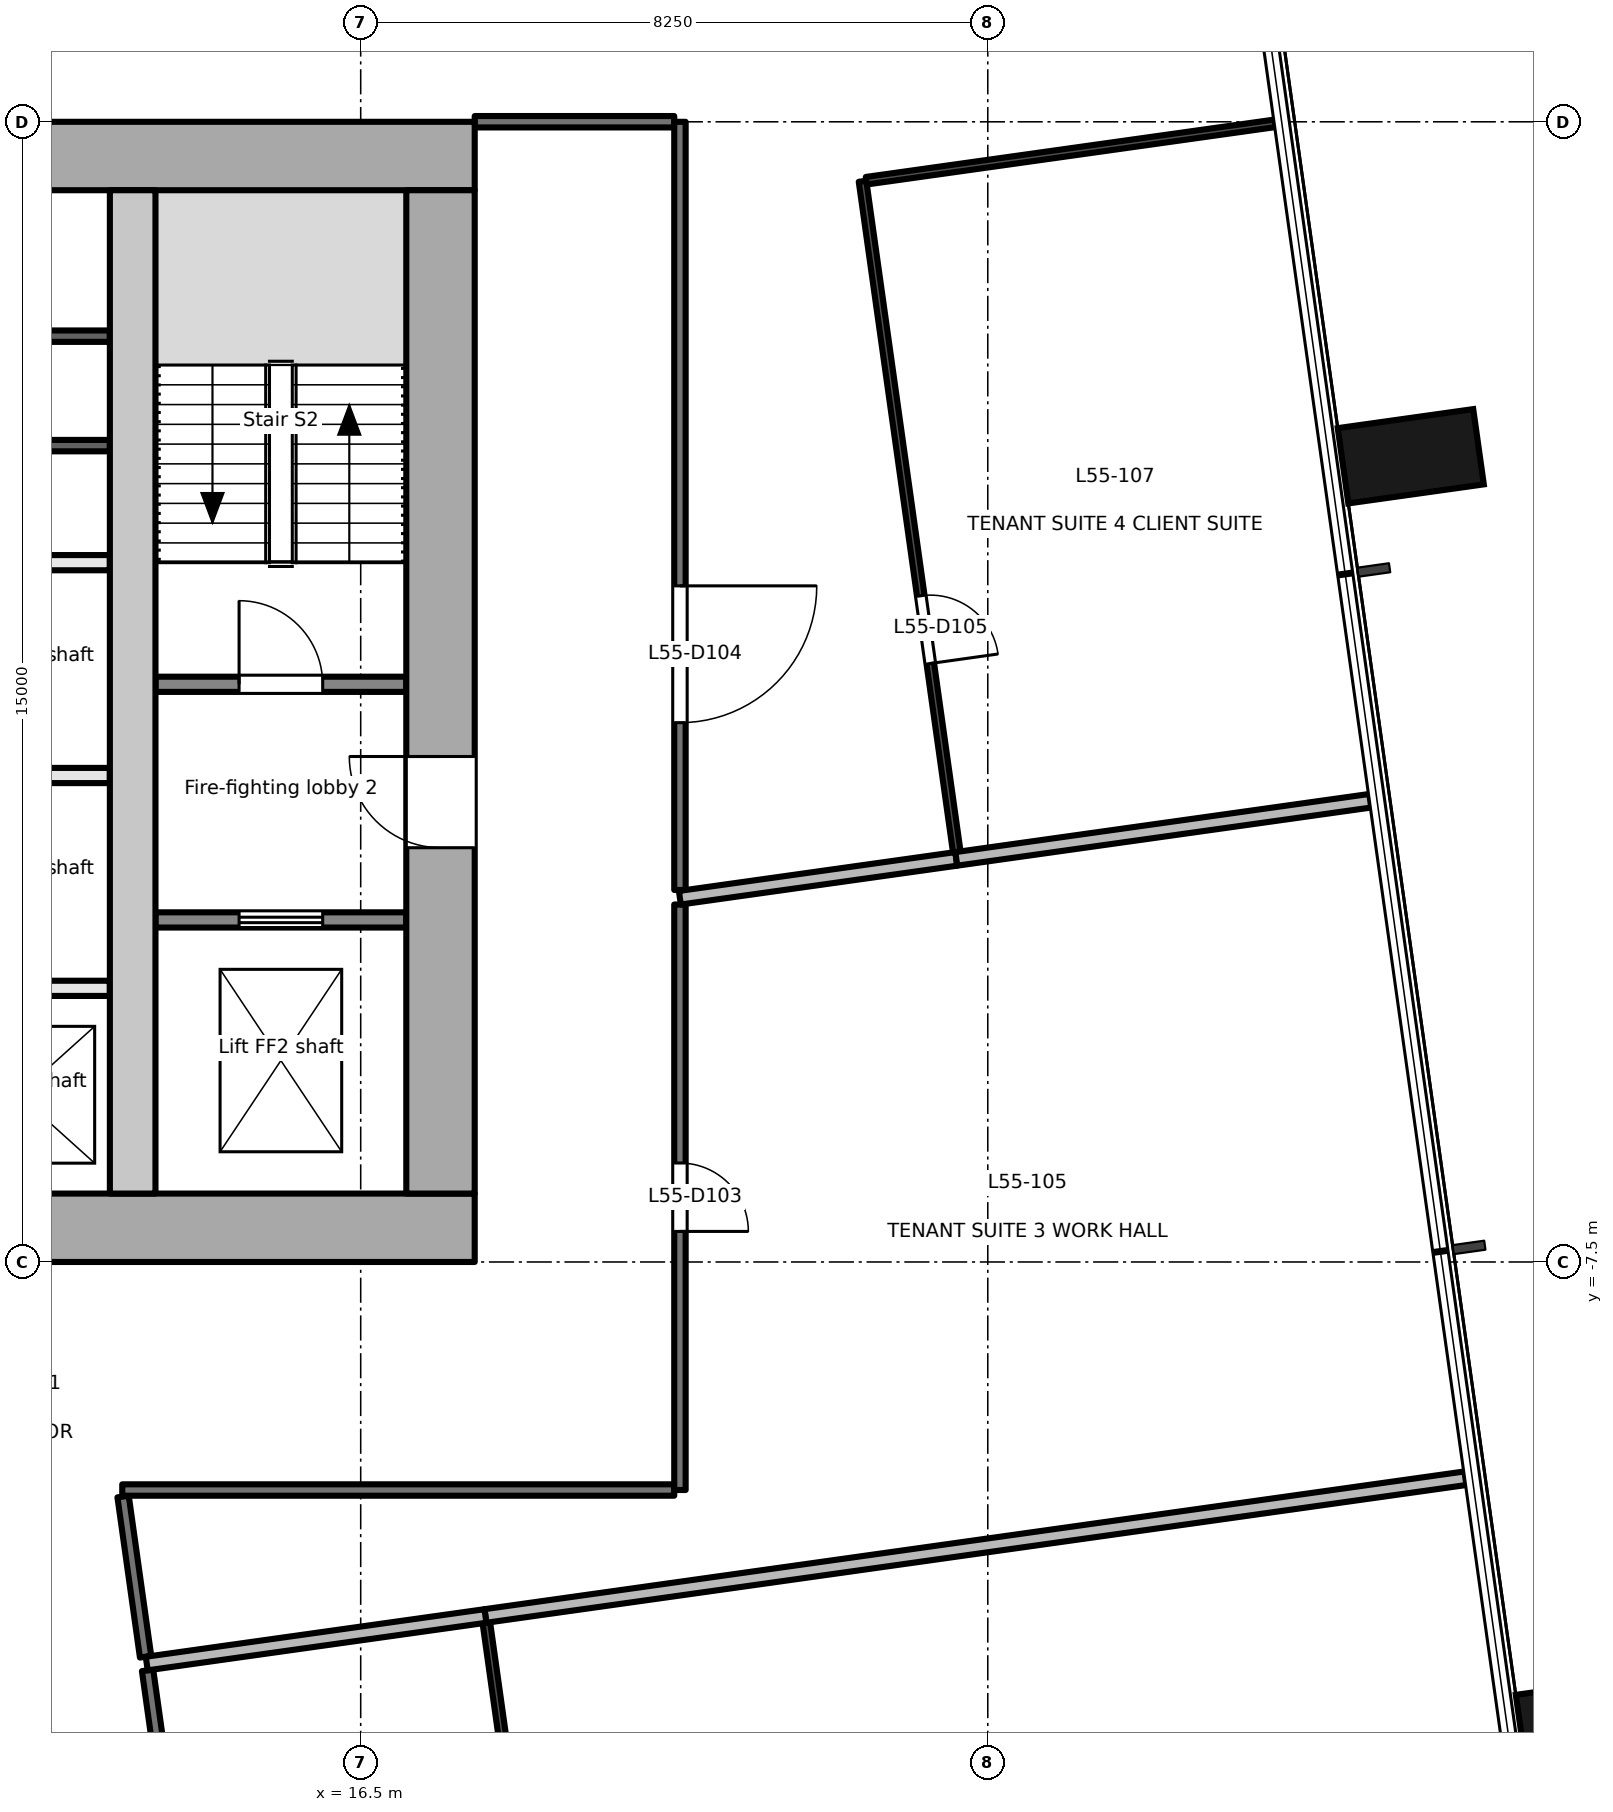
"""IFC4 building model, lengths in metres.
Left out: names, types, materials, properties, quantities, classifications, styles, units other than length and angle.
Written with IfcOpenShell. Run it as: python <this file> out.ifc"""

import sys

from ifc_helpers import new_model, si_unit, direction, frame, frame_2d, origin, origin_2d, place, context, subcontext, project, spatial, rectangle, extrude, element, fill, save


model = new_model("IFC4")
c1 = context("Model", 3, precision=1e-05, world=origin(), true_north=direction((0.0, 1.0)))
c2 = subcontext(c1, "Body", "Model", "MODEL_VIEW")
j1 = project(units=[si_unit("LENGTHUNIT", "METRE"), si_unit("PLANEANGLEUNIT", "RADIAN")], contexts=[c1])
p1 = place(None, origin())
s1 = spatial("IfcSite", under=j1, at=p1, CompositionType="ELEMENT")
p2 = place(p1, origin())
s2 = spatial("IfcBuilding", under=s1, at=p2, CompositionType="ELEMENT")
p3 = place(p2, frame((0.0, 0.0, 240.8)))
s3 = spatial("IfcBuildingStorey", under=s2, at=p3, CompositionType="ELEMENT", Elevation=240.8)
for number, where, z_axis, x_axis in (
    (1, (32.658, -13.565, -0.2), (0.0, 0.0, 1.0), (-0.139, 0.99, 0.0)),
    (2, (30.315, 3.1, -0.2), (0.0, 0.0, 1.0), (-0.139, 0.99, 0.0)),
):
    element("IfcColumn", number, at=place(p3, frame(where, z_axis=z_axis, x_axis=x_axis)), inside=s3, PredefinedType="COLUMN", context=c2, shape_type="SweptSolid", body=[
        extrude(rectangle(XDim=1.0, YDim=1.8, at=origin_2d()), origin(), (0.0, 0.0, 1.0), 3.9),
    ])
p4 = place(p3, frame((-18.0, -7.05, -0.2), z_axis=(0.0, 0.0, 1.0), x_axis=(1.0, 0.0, 0.0)))
e3 = element("IfcWall", 3, at=p4, inside=s3, PredefinedType="SHEAR", context=c2, shape_type="SweptSolid", body=[
    extrude(rectangle(XDim=36.0, YDim=0.9, at=frame_2d((18.0, 0.0))), origin(), (0.0, 0.0, 1.0), 3.9),
])
p5 = place(p4, frame((11.3, 0.0, 0.2)))
e4 = element("IfcOpeningElement", 4, at=p5, cuts=e3, PredefinedType="OPENING", context=c2, shape_type="SweptSolid", body=[
    extrude(rectangle(XDim=1.8, YDim=2.1, at=frame_2d((0.9, 1.05))), frame((0.0, 0.46, 0.0), z_axis=(0.0, -1.0, 0.0), x_axis=(1.0, 0.0, 0.0)), (0.0, 0.0, 1.0), 0.921),
])
p6 = place(p4, frame((16.8, 0.0, 0.2)))
e5 = element("IfcOpeningElement", 5, at=p6, cuts=e3, PredefinedType="OPENING", context=c2, shape_type="SweptSolid", body=[
    extrude(rectangle(XDim=2.4, YDim=2.1, at=frame_2d((1.2, 1.05))), frame((0.0, 0.46, 0.0), z_axis=(0.0, -1.0, 0.0), x_axis=(1.0, 0.0, 0.0)), (0.0, 0.0, 1.0), 0.921),
])
p7 = place(p4, frame((26.1, 0.0, 0.2)))
e6 = element("IfcOpeningElement", 6, at=p7, cuts=e3, PredefinedType="OPENING", context=c2, shape_type="SweptSolid", body=[
    extrude(rectangle(XDim=2.4, YDim=2.1, at=frame_2d((1.2, 1.05))), frame((0.0, 0.46, 0.0), z_axis=(0.0, -1.0, 0.0), x_axis=(1.0, 0.0, 0.0)), (0.0, 0.0, 1.0), 0.921),
])
p8 = place(p3, frame((-18.0, 7.05, -0.2), z_axis=(0.0, 0.0, 1.0), x_axis=(1.0, 0.0, 0.0)))
e7 = element("IfcWall", 7, at=p8, inside=s3, PredefinedType="SHEAR", context=c2, shape_type="SweptSolid", body=[
    extrude(rectangle(XDim=36.0, YDim=0.9, at=frame_2d((18.0, 0.0))), origin(), (0.0, 0.0, 1.0), 3.9),
])
p9 = place(p3, frame((17.55, -6.6, -0.2), z_axis=(0.0, 0.0, 1.0), x_axis=(0.0, 1.0, 0.0)))
e8 = element("IfcWall", 8, at=p9, inside=s3, PredefinedType="SHEAR", context=c2, shape_type="SweptSolid", body=[
    extrude(rectangle(XDim=13.2, YDim=0.9, at=frame_2d((6.6, 0.0))), origin(), (0.0, 0.0, 1.0), 3.9),
])
p10 = place(p9, frame((4.55, 0.0, 0.2)))
e9 = element("IfcOpeningElement", 9, at=p10, cuts=e8, PredefinedType="OPENING", context=c2, shape_type="SweptSolid", body=[
    extrude(rectangle(XDim=1.2, YDim=2.1, at=frame_2d((0.6, 1.05))), frame((0.0, 0.46, 0.0), z_axis=(0.0, -1.0, 0.0), x_axis=(1.0, 0.0, 0.0)), (0.0, 0.0, 1.0), 0.921),
])
p11 = place(p3, frame((13.5, -6.6, -0.2), z_axis=(0.0, 0.0, 1.0), x_axis=(0.0, 1.0, 0.0)))
e10 = element("IfcWall", 10, at=p11, inside=s3, PredefinedType="SHEAR", context=c2, shape_type="SweptSolid", body=[
    extrude(rectangle(XDim=13.2, YDim=0.6, at=frame_2d((6.6, 0.0))), origin(), (0.0, 0.0, 1.0), 3.9),
])
p12 = place(p3, frame((13.8, -3.0, 0.0), z_axis=(0.0, 0.0, 1.0), x_axis=(1.0, 0.0, 0.0)))
e11 = element("IfcWall", 11, at=p12, inside=s3, PredefinedType="PARTITIONING", context=c2, shape_type="SweptSolid", body=[
    extrude(rectangle(XDim=3.3, YDim=0.2, at=frame_2d((1.65, 0.0))), origin(), (0.0, 0.0, 1.0), 3.7),
])
p13 = place(p12, frame((1.1, 0.0, 0.0)))
e12 = element("IfcOpeningElement", 12, at=p13, cuts=e11, PredefinedType="OPENING", context=c2, shape_type="SweptSolid", body=[
    extrude(rectangle(XDim=1.1, YDim=2.1, at=frame_2d((0.55, 1.05))), frame((0.0, 0.111, 0.0), z_axis=(0.0, -1.0, 0.0), x_axis=(1.0, 0.0, 0.0)), (0.0, 0.0, 1.0), 0.221),
])
p14 = place(p3, frame((13.8, 0.1, 0.0), z_axis=(0.0, 0.0, 1.0), x_axis=(1.0, 0.0, 0.0)))
e13 = element("IfcWall", 13, at=p14, inside=s3, PredefinedType="PARTITIONING", context=c2, shape_type="SweptSolid", body=[
    extrude(rectangle(XDim=3.3, YDim=0.2, at=frame_2d((1.65, 0.0))), origin(), (0.0, 0.0, 1.0), 3.7),
])
p15 = place(p14, frame((1.1, 0.0, 0.0)))
e14 = element("IfcOpeningElement", 14, at=p15, cuts=e13, PredefinedType="OPENING", context=c2, shape_type="SweptSolid", body=[
    extrude(rectangle(XDim=1.1, YDim=2.1, at=frame_2d((0.55, 1.05))), frame((0.0, 0.111, 0.0), z_axis=(0.0, -1.0, 0.0), x_axis=(1.0, 0.0, 0.0)), (0.0, 0.0, 1.0), 0.221),
])
for number, where, z_axis, x_axis in (
    (15, (10.9, -3.9, 0.0), (0.0, 0.0, 1.0), (1.0, 0.0, 0.0)),
    (16, (10.9, -1.1, 0.0), (0.0, 0.0, 1.0), (1.0, 0.0, 0.0)),
    (17, (10.9, 1.7, 0.0), (0.0, 0.0, 1.0), (1.0, 0.0, 0.0)),
):
    element("IfcWall", number, at=place(p3, frame(where, z_axis=z_axis, x_axis=x_axis)), inside=s3, PredefinedType="PARTITIONING", context=c2, shape_type="SweptSolid", body=[
        extrude(rectangle(XDim=2.3, YDim=0.2, at=frame_2d((1.15, 0.0))), origin(), (0.0, 0.0, 1.0), 3.7),
    ])
for number, where, z_axis, x_axis in (
    (18, (10.9, 3.24, 0.0), (0.0, 0.0, 1.0), (1.0, 0.0, 0.0)),
    (19, (10.9, 4.68, 0.0), (0.0, 0.0, 1.0), (1.0, 0.0, 0.0)),
):
    element("IfcWall", number, at=place(p3, frame(where, z_axis=z_axis, x_axis=x_axis)), inside=s3, PredefinedType="PARTITIONING", context=c2, shape_type="SweptSolid", body=[
        extrude(rectangle(XDim=2.3, YDim=0.15, at=frame_2d((1.15, 0.0))), origin(), (0.0, 0.0, 1.0), 3.7),
    ])
p16 = place(p3, frame((13.696, -12.872, 0.0), z_axis=(0.0, 0.0, 1.0), x_axis=(0.139217899128, -0.990261771736, 0.0)))
e20 = element("IfcWall", 20, at=p16, inside=s3, PredefinedType="PARTITIONING", context=c2, shape_type="SweptSolid", body=[
    extrude(rectangle(XDim=7.09, YDim=0.15, at=frame_2d((3.545, 0.0))), origin(), (0.0, 0.0, 1.0), 2.9),
])
p17 = place(p3, frame((13.374, -10.586, 0.0), z_axis=(0.0, 0.0, 1.0), x_axis=(0.13899652087, -0.990292869401, 0.0)))
e21 = element("IfcWall", 21, at=p17, inside=s3, PredefinedType="PARTITIONING", context=c2, shape_type="SweptSolid", body=[
    extrude(rectangle(XDim=2.129, YDim=0.15, at=frame_2d((1.064, 0.0))), origin(), (0.0, 0.0, 1.0), 2.9),
])
p18 = place(p3, frame((20.625, -10.5, 0.0), z_axis=(0.0, 0.0, 1.0), x_axis=(-1.0, 0.0, 0.0)))
e22 = element("IfcWall", 22, at=p18, inside=s3, PredefinedType="PARTITIONING", context=c2, shape_type="SweptSolid", body=[
    extrude(rectangle(XDim=7.262, YDim=0.15, at=frame_2d((3.631, 0.0))), origin(), (0.0, 0.0, 1.0), 2.9),
])
p19 = place(p3, frame((20.7, -2.797, 0.0), z_axis=(0.0, 0.0, 1.0), x_axis=(0.0, -1.0, 0.0)))
e23 = element("IfcWall", 23, at=p19, inside=s3, PredefinedType="PARTITIONING", context=c2, shape_type="SweptSolid", body=[
    extrude(rectangle(XDim=7.703, YDim=0.15, at=frame_2d((3.852, 0.0))), origin(), (0.0, 0.0, 1.0), 3.1),
])
p20 = place(p19, frame((3.401, 0.0, 0.0)))
e24 = element("IfcOpeningElement", 24, at=p20, cuts=e23, PredefinedType="OPENING", context=c2, shape_type="SweptSolid", body=[
    extrude(rectangle(XDim=0.9, YDim=2.1, at=frame_2d((0.45, 1.05))), frame((0.0, 0.085, 0.0), z_axis=(0.0, -1.0, 0.0), x_axis=(1.0, 0.0, 0.0)), (0.0, 0.0, 1.0), 0.171),
])
p21 = place(p3, frame((18.0, 7.501, 0.0), z_axis=(0.0, 0.0, 1.0), x_axis=(1.0, 0.0, 0.0)))
e25 = element("IfcWall", 25, at=p21, inside=s3, PredefinedType="PARTITIONING", context=c2, shape_type="SweptSolid", body=[
    extrude(rectangle(XDim=2.625, YDim=0.15, at=frame_2d((1.312, 0.0))), origin(), (0.0, 0.0, 1.0), 3.7),
])
p22 = place(p3, frame((20.7, 7.5, 0.0), z_axis=(0.0, 0.0, 1.0), x_axis=(0.0, -1.0, 0.0)))
e26 = element("IfcWall", 26, at=p22, inside=s3, PredefinedType="PARTITIONING", context=c2, shape_type="SweptSolid", body=[
    extrude(rectangle(XDim=10.106, YDim=0.15, at=frame_2d((5.053, 0.0))), origin(), (0.0, 0.0, 1.0), 3.15),
])
p23 = place(p22, frame((6.105, 0.0, 0.0)))
e27 = element("IfcOpeningElement", 27, at=p23, cuts=e26, PredefinedType="OPENING", context=c2, shape_type="SweptSolid", body=[
    extrude(rectangle(XDim=1.8, YDim=2.1, at=frame_2d((0.9, 1.05))), frame((0.0, 0.085, 0.0), z_axis=(0.0, -1.0, 0.0), x_axis=(1.0, 0.0, 0.0)), (0.0, 0.0, 1.0), 0.171),
])
p24 = place(p3, frame((12.644, -24.785, 0.0), z_axis=(0.0, 0.0, 1.0), x_axis=(-0.139086535292, 0.990280230894, 0.0)))
e28 = element("IfcWall", 28, at=p24, inside=s3, PredefinedType="PARTITIONING", context=c2, shape_type="SweptSolid", body=[
    extrude(rectangle(XDim=11.669, YDim=0.15, at=frame_2d((5.835, 0.0))), origin(), (0.0, 0.0, 1.0), 3.7),
])
p25 = place(p24, frame((2.667, 0.0, 0.0)))
e29 = element("IfcOpeningElement", 29, at=p25, cuts=e28, PredefinedType="OPENING", context=c2, shape_type="SweptSolid", body=[
    extrude(rectangle(XDim=1.5, YDim=2.1, at=frame_2d((0.75, 1.05))), frame((0.0, 0.085, 0.0), z_axis=(0.0, -1.0, 0.0), x_axis=(1.0, 0.0, 0.0)), (0.0, 0.0, 1.0), 0.171),
])
p26 = place(p3, frame((19.137, -19.247, 0.0), z_axis=(0.0, 0.0, 1.0), x_axis=(-0.139168056016, 0.990268777749, 0.0)))
e30 = element("IfcWall", 30, at=p26, inside=s3, PredefinedType="PARTITIONING", context=c2, shape_type="SweptSolid", body=[
    extrude(rectangle(XDim=7.07, YDim=0.1, at=frame_2d((3.535, 0.0))), origin(), (0.0, 0.0, 1.0), 3.7),
])
p27 = place(p26, frame((3.085, 0.0, 0.0)))
e31 = element("IfcOpeningElement", 31, at=p27, cuts=e30, PredefinedType="OPENING", context=c2, shape_type="SweptSolid", body=[
    extrude(rectangle(XDim=0.9, YDim=2.1, at=frame_2d((0.45, 1.05))), frame((0.0, 0.061, 0.0), z_axis=(0.0, -1.0, 0.0), x_axis=(1.0, 0.0, 0.0)), (0.0, 0.0, 1.0), 0.121),
])
p28 = place(p3, frame((18.141, -12.157, 0.0), z_axis=(0.0, 0.0, 1.0), x_axis=(0.99026760598, 0.139176393637, 0.0)))
e32 = element("IfcWall", 32, at=p28, inside=s3, PredefinedType="PARTITIONING", context=c2, shape_type="SweptSolid", body=[
    extrude(rectangle(XDim=13.02, YDim=0.18, at=frame_2d((6.51, 0.0))), origin(), (0.0, 0.0, 1.0), 3.7),
])
p29 = place(p3, frame((13.685, -12.783, 0.0), z_axis=(0.0, 0.0, 1.0), x_axis=(0.99027667576, 0.139111845094, 0.0)))
e33 = element("IfcWall", 33, at=p29, inside=s3, PredefinedType="PARTITIONING", context=c2, shape_type="SweptSolid", body=[
    extrude(rectangle(XDim=4.5, YDim=0.18, at=frame_2d((2.25, 0.0))), origin(), (0.0, 0.0, 1.0), 3.7),
])
p30 = place(p3, frame((20.699, -2.708, 0.0), z_axis=(0.0, 0.0, 1.0), x_axis=(0.990268752824, 0.139168233375, 0.0)))
e34 = element("IfcWall", 34, at=p30, inside=s3, PredefinedType="PARTITIONING", context=c2, shape_type="SweptSolid", body=[
    extrude(rectangle(XDim=3.672, YDim=0.18, at=frame_2d((1.836, 0.0))), origin(), (0.0, 0.0, 1.0), 3.7),
])
p31 = place(p3, frame((24.336, -2.197, 0.0), z_axis=(0.0, 0.0, 1.0), x_axis=(0.990274457527, 0.139127634818, 0.0)))
e35 = element("IfcWall", 35, at=p31, inside=s3, PredefinedType="PARTITIONING", context=c2, shape_type="SweptSolid", body=[
    extrude(rectangle(XDim=5.5, YDim=0.18, at=frame_2d((2.75, 0.0))), origin(), (0.0, 0.0, 1.0), 3.7),
])
p32 = place(p3, frame((23.102, 6.718, 0.0), z_axis=(0.0, 0.0, 1.0), x_axis=(0.139172960551, -0.990268088475, 0.0)))
e36 = element("IfcWall", 36, at=p32, inside=s3, PredefinedType="PARTITIONING", context=c2, shape_type="SweptSolid", body=[
    extrude(rectangle(XDim=8.91, YDim=0.1, at=frame_2d((4.455, 0.0))), origin(), (0.0, 0.0, 1.0), 3.15),
])
p33 = place(p32, frame((5.507, 0.0, 0.0)))
e37 = element("IfcOpeningElement", 37, at=p33, cuts=e36, PredefinedType="OPENING", context=c2, shape_type="SweptSolid", body=[
    extrude(rectangle(XDim=0.9, YDim=2.1, at=frame_2d((0.45, 1.05))), frame((0.0, 0.061, 0.0), z_axis=(0.0, -1.0, 0.0), x_axis=(1.0, 0.0, 0.0)), (0.0, 0.0, 1.0), 0.121),
])
p34 = place(p3, frame((28.528, 7.48, 0.0), z_axis=(0.0, 0.0, 1.0), x_axis=(-0.990284853007, -0.139053622411, 0.0)))
e38 = element("IfcWall", 38, at=p34, inside=s3, PredefinedType="PARTITIONING", context=c2, shape_type="SweptSolid", body=[
    extrude(rectangle(XDim=5.429, YDim=0.1, at=frame_2d((2.714, 0.0))), origin(), (0.0, 0.0, 1.0), 3.7),
])
p35 = place(p13, origin())
e39 = element("IfcDoor", 39, at=p35, inside=s3, OperationType="DOUBLE_DOOR_SLIDING", PredefinedType="DOOR", context=c2, shape_type="SweptSolid", body=[
    extrude(rectangle(XDim=1.1, YDim=2.1, at=frame_2d((0.55, 1.05))), frame((0.0, 0.025, 0.0), z_axis=(0.0, -1.0, 0.0), x_axis=(1.0, 0.0, 0.0)), (0.0, 0.0, 1.0), 0.05),
])
fill(e12, e39)
p36 = place(p10, origin())
e40 = element("IfcDoor", 40, at=p36, inside=s3, OperationType="SINGLE_SWING_RIGHT", PredefinedType="DOOR", context=c2, shape_type="SweptSolid", body=[
    extrude(rectangle(XDim=1.2, YDim=2.1, at=frame_2d((0.6, 1.05))), frame((0.0, 0.025, 0.0), z_axis=(0.0, -1.0, 0.0), x_axis=(1.0, 0.0, 0.0)), (0.0, 0.0, 1.0), 0.05),
])
fill(e9, e40)
p37 = place(p15, origin())
e41 = element("IfcDoor", 41, at=p37, inside=s3, OperationType="SINGLE_SWING_LEFT", PredefinedType="DOOR", context=c2, shape_type="SweptSolid", body=[
    extrude(rectangle(XDim=1.1, YDim=2.1, at=frame_2d((0.55, 1.05))), frame((0.0, 0.025, 0.0), z_axis=(0.0, -1.0, 0.0), x_axis=(1.0, 0.0, 0.0)), (0.0, 0.0, 1.0), 0.05),
])
fill(e14, e41)
p38 = place(p20, origin())
e42 = element("IfcDoor", 42, at=p38, inside=s3, OperationType="SINGLE_SWING_RIGHT", PredefinedType="DOOR", context=c2, shape_type="SweptSolid", body=[
    extrude(rectangle(XDim=0.9, YDim=2.1, at=frame_2d((0.45, 1.05))), frame((0.0, 0.025, 0.0), z_axis=(0.0, -1.0, 0.0), x_axis=(1.0, 0.0, 0.0)), (0.0, 0.0, 1.0), 0.05),
])
fill(e24, e42)
p39 = place(p23, origin())
e43 = element("IfcDoor", 43, at=p39, inside=s3, OperationType="DOUBLE_DOOR_SINGLE_SWING", PredefinedType="DOOR", context=c2, shape_type="SweptSolid", body=[
    extrude(rectangle(XDim=1.8, YDim=2.1, at=frame_2d((0.9, 1.05))), frame((0.0, 0.025, 0.0), z_axis=(0.0, -1.0, 0.0), x_axis=(1.0, 0.0, 0.0)), (0.0, 0.0, 1.0), 0.05),
])
fill(e27, e43)
p40 = place(p33, origin())
e44 = element("IfcDoor", 44, at=p40, inside=s3, OperationType="SINGLE_SWING_RIGHT", PredefinedType="DOOR", context=c2, shape_type="SweptSolid", body=[
    extrude(rectangle(XDim=0.9, YDim=2.1, at=frame_2d((0.45, 1.05))), frame((0.0, 0.025, 0.0), z_axis=(0.0, -1.0, 0.0), x_axis=(1.0, 0.0, 0.0)), (0.0, 0.0, 1.0), 0.05),
])
fill(e37, e44)
save(model, sys.argv[1])
